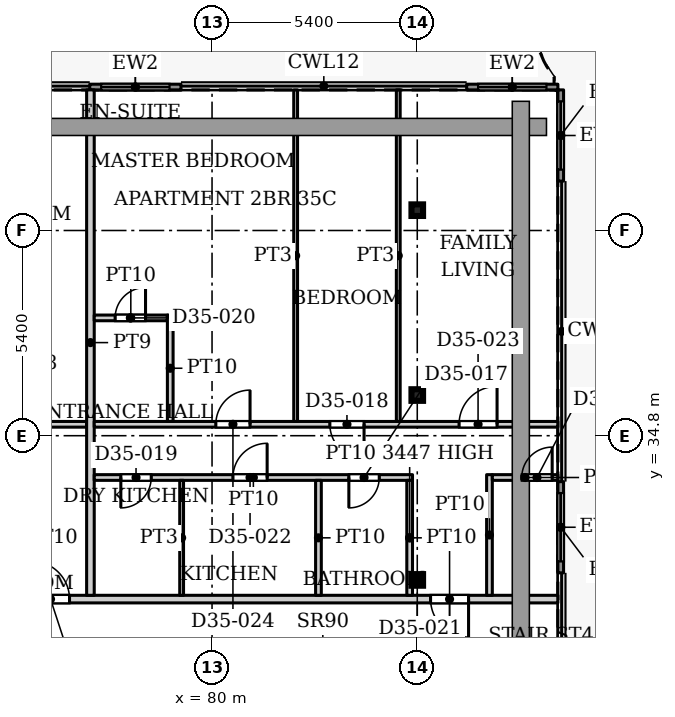
"""IFC4 building model, lengths in metres.
Left out: names, types, materials, properties, quantities, classifications, styles, units other than length and angle.
Written with IfcOpenShell. Run it as: python <this file> out.ifc"""

import sys

from ifc_helpers import new_model, si_unit, direction, frame, frame_2d, origin, origin_2d, place, context, subcontext, project, spatial, rectangle, hollow_rectangle, extrude, source, transform, mapped, element, fill, save


model = new_model("IFC4")
c1 = context("Model", 3, precision=1e-05, world=origin(), true_north=direction((0.0, 1.0)))
c2 = subcontext(c1, "Body", "Model", "MODEL_VIEW")
j1 = project(units=[si_unit("LENGTHUNIT", "METRE"), si_unit("PLANEANGLEUNIT", "RADIAN")], contexts=[c1])
p1 = place(None, origin())
s1 = spatial("IfcSite", under=j1, at=p1, CompositionType="ELEMENT")
p2 = place(p1, origin())
s2 = spatial("IfcBuilding", under=s1, at=p2, CompositionType="ELEMENT")
p3 = place(p2, frame((0.0, 0.0, 152.6)))
s3 = spatial("IfcBuildingStorey", under=s2, at=p3, CompositionType="ELEMENT", Elevation=152.6)
for number, where, z_axis, x_axis in (
    (1, (85.4, 31.005, 0.0), (0.0, 0.0, 1.0), (1.0, 0.0, 0.0)),
    (2, (85.4, 35.87, 0.0), (0.0, 0.0, 1.0), (1.0, 0.0, 0.0)),
    (3, (85.4, 40.735, 0.0), (0.0, 0.0, 1.0), (1.0, 0.0, 0.0)),
):
    element("IfcColumn", number, at=place(p3, frame(where, z_axis=z_axis, x_axis=x_axis)), inside=s3, PredefinedType="COLUMN", context=c2, shape_type="SweptSolid", body=[
        extrude(hollow_rectangle(XDim=0.305, YDim=0.305, WallThickness=0.016, InnerFilletRadius=0.016, OuterFilletRadius=0.032, at=origin_2d()), origin(), (0.0, 0.0, 1.0), 3.9),
    ])
p4 = place(p3, frame((76.782, 43.975, 0.0), z_axis=(0.0, 0.0, 1.0), x_axis=(1.0, 0.0, 0.0)))
e4 = element("IfcWall", 4, at=p4, inside=s3, PredefinedType="SOLIDWALL", context=c2, shape_type="SweptSolid", body=[
    extrude(rectangle(XDim=2.4, YDim=0.15, at=frame_2d((1.2, 0.0))), origin(), (0.0, 0.0, 1.0), 3.75),
])
p5 = place(p4, frame((0.3, 0.0, 0.0)))
e5 = element("IfcOpeningElement", 5, at=p5, cuts=e4, PredefinedType="OPENING", context=c2, shape_type="SweptSolid", body=[
    extrude(rectangle(XDim=1.8, YDim=2.4, at=frame_2d((0.9, 1.2))), frame((0.0, 0.085, 0.0), z_axis=(0.0, -1.0, 0.0), x_axis=(1.0, 0.0, 0.0)), (0.0, 0.0, 1.0), 0.17),
])
p6 = place(p3, frame((86.7, 43.975, 0.0), z_axis=(0.0, 0.0, 1.0), x_axis=(1.0, 0.0, 0.0)))
e6 = element("IfcWall", 6, at=p6, inside=s3, PredefinedType="SOLIDWALL", context=c2, shape_type="SweptSolid", body=[
    extrude(rectangle(XDim=2.4, YDim=0.15, at=frame_2d((1.2, 0.0))), origin(), (0.0, 0.0, 1.0), 3.75),
])
p7 = place(p6, frame((0.3, 0.0, 0.0)))
e7 = element("IfcOpeningElement", 7, at=p7, cuts=e6, PredefinedType="OPENING", context=c2, shape_type="SweptSolid", body=[
    extrude(rectangle(XDim=1.8, YDim=2.4, at=frame_2d((0.9, 1.2))), frame((0.0, 0.085, 0.0), z_axis=(0.0, -1.0, 0.0), x_axis=(1.0, 0.0, 0.0)), (0.0, 0.0, 1.0), 0.17),
])
p8 = place(p3, frame((89.175, 43.9, 0.0), z_axis=(0.0, 0.0, 1.0), x_axis=(0.0, -1.0, 0.0)))
e8 = element("IfcWall", 8, at=p8, inside=s3, PredefinedType="SOLIDWALL", context=c2, shape_type="SweptSolid", body=[
    extrude(rectangle(XDim=2.4, YDim=0.15, at=frame_2d((1.2, 0.0))), origin(), (0.0, 0.0, 1.0), 3.75),
])
p9 = place(p8, frame((0.3, 0.0, 0.0)))
e9 = element("IfcOpeningElement", 9, at=p9, cuts=e8, PredefinedType="OPENING", context=c2, shape_type="SweptSolid", body=[
    extrude(rectangle(XDim=1.8, YDim=2.4, at=frame_2d((0.9, 1.2))), frame((0.0, 0.085, 0.0), z_axis=(0.0, -1.0, 0.0), x_axis=(1.0, 0.0, 0.0)), (0.0, 0.0, 1.0), 0.17),
])
p10 = place(p3, frame((89.175, 33.591, 0.0), z_axis=(0.0, 0.0, 1.0), x_axis=(0.0, -1.0, 0.0)))
e10 = element("IfcWall", 10, at=p10, inside=s3, PredefinedType="SOLIDWALL", context=c2, shape_type="SweptSolid", body=[
    extrude(rectangle(XDim=2.4, YDim=0.15, at=frame_2d((1.2, 0.0))), origin(), (0.0, 0.0, 1.0), 3.75),
])
p11 = place(p10, frame((0.3, 0.0, 0.0)))
e11 = element("IfcOpeningElement", 11, at=p11, cuts=e10, PredefinedType="OPENING", context=c2, shape_type="SweptSolid", body=[
    extrude(rectangle(XDim=1.8, YDim=2.4, at=frame_2d((0.9, 1.2))), frame((0.0, 0.085, 0.0), z_axis=(0.0, -1.0, 0.0), x_axis=(1.0, 0.0, 0.0)), (0.0, 0.0, 1.0), 0.17),
])
p12 = place(p3, frame((53.549, 30.5, 0.0), z_axis=(0.0, 0.0, 1.0), x_axis=(1.0, 0.0, 0.0)))
e12 = element("IfcWall", 12, at=p12, inside=s3, PredefinedType="PARTITIONING", context=c2, shape_type="SweptSolid", body=[
    extrude(rectangle(XDim=35.551, YDim=0.2, at=frame_2d((17.775, 0.0))), origin(), (0.0, 0.0, 1.0), 3.6),
])
p13 = place(p12, frame((0.251, 0.0, 0.0)))
e13 = element("IfcOpeningElement", 13, at=p13, cuts=e12, PredefinedType="OPENING", context=c2, shape_type="SweptSolid", body=[
    extrude(rectangle(XDim=1.0, YDim=2.1, at=frame_2d((0.5, 1.05))), frame((0.0, 0.11, 0.0), z_axis=(0.0, -1.0, 0.0), x_axis=(1.0, 0.0, 0.0)), (0.0, 0.0, 1.0), 0.22),
])
p14 = place(p12, frame((21.701, 0.0, 0.0)))
e14 = element("IfcOpeningElement", 14, at=p14, cuts=e12, PredefinedType="OPENING", context=c2, shape_type="SweptSolid", body=[
    extrude(rectangle(XDim=1.0, YDim=2.1, at=frame_2d((0.5, 1.05))), frame((0.0, 0.11, 0.0), z_axis=(0.0, -1.0, 0.0), x_axis=(1.0, 0.0, 0.0)), (0.0, 0.0, 1.0), 0.22),
])
p15 = place(p12, frame((32.201, 0.0, 0.0)))
e15 = element("IfcOpeningElement", 15, at=p15, cuts=e12, PredefinedType="OPENING", context=c2, shape_type="SweptSolid", body=[
    extrude(rectangle(XDim=1.0, YDim=2.1, at=frame_2d((0.5, 1.05))), frame((0.0, 0.11, 0.0), z_axis=(0.0, -1.0, 0.0), x_axis=(1.0, 0.0, 0.0)), (0.0, 0.0, 1.0), 0.22),
])
p16 = place(p3, frame((62.8, 35.1, 0.0), z_axis=(0.0, 0.0, 1.0), x_axis=(1.0, 0.0, 0.0)))
e16 = element("IfcWall", 16, at=p16, inside=s3, PredefinedType="PARTITIONING", context=c2, shape_type="SweptSolid", body=[
    extrude(rectangle(XDim=13.9, YDim=0.15, at=frame_2d((6.95, 0.0))), origin(), (0.0, 0.0, 1.0), 3.6),
])
p17 = place(p16, frame((11.6, 0.0, 0.0)))
e17 = element("IfcOpeningElement", 17, at=p17, cuts=e16, PredefinedType="OPENING", context=c2, shape_type="SweptSolid", body=[
    extrude(rectangle(XDim=0.9, YDim=2.1, at=frame_2d((0.45, 1.05))), frame((0.0, 0.085, 0.0), z_axis=(0.0, -1.0, 0.0), x_axis=(1.0, 0.0, 0.0)), (0.0, 0.0, 1.0), 0.17),
])
p18 = place(p16, frame((1.8, 0.0, 0.0)))
e18 = element("IfcOpeningElement", 18, at=p18, cuts=e16, PredefinedType="OPENING", context=c2, shape_type="SweptSolid", body=[
    extrude(rectangle(XDim=1.0, YDim=2.1, at=frame_2d((0.5, 1.05))), frame((0.0, 0.085, 0.0), z_axis=(0.0, -1.0, 0.0), x_axis=(1.0, 0.0, 0.0)), (0.0, 0.0, 1.0), 0.17),
])
p19 = place(p16, frame((5.5, 0.0, 0.0)))
e19 = element("IfcOpeningElement", 19, at=p19, cuts=e16, PredefinedType="OPENING", context=c2, shape_type="SweptSolid", body=[
    extrude(rectangle(XDim=0.9, YDim=2.1, at=frame_2d((0.45, 1.05))), frame((0.0, 0.085, 0.0), z_axis=(0.0, -1.0, 0.0), x_axis=(1.0, 0.0, 0.0)), (0.0, 0.0, 1.0), 0.17),
])
p20 = place(p3, frame((76.8, 30.6, 0.0), z_axis=(0.0, 0.0, 1.0), x_axis=(0.0, 1.0, 0.0)))
e20 = element("IfcWall", 20, at=p20, inside=s3, PredefinedType="PARTITIONING", context=c2, shape_type="SweptSolid", body=[
    extrude(rectangle(XDim=13.3, YDim=0.2, at=frame_2d((6.65, 0.0))), origin(), (0.0, 0.0, 1.0), 3.6),
])
p21 = place(p3, frame((76.9, 33.7, 0.0), z_axis=(0.0, 0.0, 1.0), x_axis=(1.0, 0.0, 0.0)))
e21 = element("IfcWall", 21, at=p21, inside=s3, PredefinedType="PARTITIONING", context=c2, shape_type="SweptSolid", body=[
    extrude(rectangle(XDim=8.375, YDim=0.15, at=frame_2d((4.188, 0.0))), origin(), (0.0, 0.0, 1.0), 3.6),
])
p22 = place(p21, frame((6.7, 0.0, 0.0)))
e22 = element("IfcOpeningElement", 22, at=p22, cuts=e21, PredefinedType="OPENING", context=c2, shape_type="SweptSolid", body=[
    extrude(rectangle(XDim=0.8, YDim=2.1, at=frame_2d((0.4, 1.05))), frame((0.0, 0.085, 0.0), z_axis=(0.0, -1.0, 0.0), x_axis=(1.0, 0.0, 0.0)), (0.0, 0.0, 1.0), 0.17),
])
p23 = place(p21, frame((0.7, 0.0, 0.0)))
e23 = element("IfcOpeningElement", 23, at=p23, cuts=e21, PredefinedType="OPENING", context=c2, shape_type="SweptSolid", body=[
    extrude(rectangle(XDim=0.8, YDim=2.1, at=frame_2d((0.4, 1.05))), frame((0.0, 0.085, 0.0), z_axis=(0.0, -1.0, 0.0), x_axis=(1.0, 0.0, 0.0)), (0.0, 0.0, 1.0), 0.17),
])
p24 = place(p21, frame((3.65, 0.0, 0.0)))
e24 = element("IfcOpeningElement", 24, at=p24, cuts=e21, PredefinedType="OPENING", context=c2, shape_type="SweptSolid", body=[
    extrude(rectangle(XDim=0.9, YDim=2.1, at=frame_2d((0.45, 1.05))), frame((0.0, 0.085, 0.0), z_axis=(0.0, -1.0, 0.0), x_axis=(1.0, 0.0, 0.0)), (0.0, 0.0, 1.0), 0.17),
])
p25 = place(p3, frame((76.9, 35.1, 0.0), z_axis=(0.0, 0.0, 1.0), x_axis=(1.0, 0.0, 0.0)))
e25 = element("IfcWall", 25, at=p25, inside=s3, PredefinedType="PARTITIONING", context=c2, shape_type="SweptSolid", body=[
    extrude(rectangle(XDim=12.2, YDim=0.15, at=frame_2d((6.1, 0.0))), origin(), (0.0, 0.0, 1.0), 3.6),
])
p26 = place(p25, frame((6.2, 0.0, 0.0)))
e26 = element("IfcOpeningElement", 26, at=p26, cuts=e25, PredefinedType="OPENING", context=c2, shape_type="SweptSolid", body=[
    extrude(rectangle(XDim=0.9, YDim=2.1, at=frame_2d((0.45, 1.05))), frame((0.0, 0.085, 0.0), z_axis=(0.0, -1.0, 0.0), x_axis=(1.0, 0.0, 0.0)), (0.0, 0.0, 1.0), 0.17),
])
p27 = place(p25, frame((9.6, 0.0, 0.0)))
e27 = element("IfcOpeningElement", 27, at=p27, cuts=e25, PredefinedType="OPENING", context=c2, shape_type="SweptSolid", body=[
    extrude(rectangle(XDim=1.0, YDim=2.1, at=frame_2d((0.5, 1.05))), frame((0.0, 0.085, 0.0), z_axis=(0.0, -1.0, 0.0), x_axis=(1.0, 0.0, 0.0)), (0.0, 0.0, 1.0), 0.17),
])
p28 = place(p25, frame((3.2, 0.0, 0.0)))
e28 = element("IfcOpeningElement", 28, at=p28, cuts=e25, PredefinedType="OPENING", context=c2, shape_type="SweptSolid", body=[
    extrude(rectangle(XDim=0.9, YDim=2.1, at=frame_2d((0.45, 1.05))), frame((0.0, 0.085, 0.0), z_axis=(0.0, -1.0, 0.0), x_axis=(1.0, 0.0, 0.0)), (0.0, 0.0, 1.0), 0.17),
])
p29 = place(p3, frame((76.9, 37.9, 0.0), z_axis=(0.0, 0.0, 1.0), x_axis=(1.0, 0.0, 0.0)))
e29 = element("IfcWall", 29, at=p29, inside=s3, PredefinedType="PARTITIONING", context=c2, shape_type="SweptSolid", body=[
    extrude(rectangle(XDim=1.925, YDim=0.15, at=frame_2d((0.962, 0.0))), origin(), (0.0, 0.0, 1.0), 3.6),
])
p30 = place(p29, frame((0.55, 0.0, 0.0)))
e30 = element("IfcOpeningElement", 30, at=p30, cuts=e29, PredefinedType="OPENING", context=c2, shape_type="SweptSolid", body=[
    extrude(rectangle(XDim=0.8, YDim=2.1, at=frame_2d((0.4, 1.05))), frame((0.0, 0.085, 0.0), z_axis=(0.0, -1.0, 0.0), x_axis=(1.0, 0.0, 0.0)), (0.0, 0.0, 1.0), 0.17),
])
p31 = place(p3, frame((78.9, 35.175, 0.0), z_axis=(0.0, 0.0, 1.0), x_axis=(0.0, 1.0, 0.0)))
e31 = element("IfcWall", 31, at=p31, inside=s3, PredefinedType="PARTITIONING", context=c2, shape_type="SweptSolid", body=[
    extrude(rectangle(XDim=2.8, YDim=0.15, at=frame_2d((1.4, 0.0))), origin(), (0.0, 0.0, 1.0), 3.6),
])
p32 = place(p3, frame((79.2, 30.6, 0.0), z_axis=(0.0, 0.0, 1.0), x_axis=(0.0, 1.0, 0.0)))
e32 = element("IfcWall", 32, at=p32, inside=s3, PredefinedType="PARTITIONING", context=c2, shape_type="SweptSolid", body=[
    extrude(rectangle(XDim=3.025, YDim=0.1, at=frame_2d((1.512, 0.0))), origin(), (0.0, 0.0, 1.0), 3.6),
])
p33 = place(p3, frame((82.2, 35.175, 0.0), z_axis=(0.0, 0.0, 1.0), x_axis=(0.0, 1.0, 0.0)))
e33 = element("IfcWall", 33, at=p33, inside=s3, PredefinedType="PARTITIONING", context=c2, shape_type="SweptSolid", body=[
    extrude(rectangle(XDim=8.725, YDim=0.1, at=frame_2d((4.362, 0.0))), origin(), (0.0, 0.0, 1.0), 3.6),
])
p34 = place(p3, frame((82.8, 30.6, 0.0), z_axis=(0.0, 0.0, 1.0), x_axis=(0.0, 1.0, 0.0)))
e34 = element("IfcWall", 34, at=p34, inside=s3, PredefinedType="PARTITIONING", context=c2, shape_type="SweptSolid", body=[
    extrude(rectangle(XDim=3.025, YDim=0.15, at=frame_2d((1.512, 0.0))), origin(), (0.0, 0.0, 1.0), 3.6),
])
p35 = place(p3, frame((84.9, 35.175, 0.0), z_axis=(0.0, 0.0, 1.0), x_axis=(0.0, 1.0, 0.0)))
e35 = element("IfcWall", 35, at=p35, inside=s3, PredefinedType="PARTITIONING", context=c2, shape_type="SweptSolid", body=[
    extrude(rectangle(XDim=8.725, YDim=0.1, at=frame_2d((4.362, 0.0))), origin(), (0.0, 0.0, 1.0), 3.6),
])
p36 = place(p3, frame((85.2, 30.6, 0.0), z_axis=(0.0, 0.0, 1.0), x_axis=(0.0, 1.0, 0.0)))
e36 = element("IfcWall", 36, at=p36, inside=s3, PredefinedType="PARTITIONING", context=c2, shape_type="SweptSolid", body=[
    extrude(rectangle(XDim=3.025, YDim=0.15, at=frame_2d((1.512, 0.0))), origin(), (0.0, 0.0, 1.0), 3.447),
])
p37 = place(p3, frame((87.3, 30.6, 0.0), z_axis=(0.0, 0.0, 1.0), x_axis=(0.0, 1.0, 0.0)))
e37 = element("IfcWall", 37, at=p37, inside=s3, PredefinedType="PARTITIONING", context=c2, shape_type="SweptSolid", body=[
    extrude(rectangle(XDim=3.175, YDim=0.15, at=frame_2d((1.587, 0.0))), origin(), (0.0, 0.0, 1.0), 3.6),
])
p38 = place(p3, frame((87.375, 33.7, 0.0), z_axis=(0.0, 0.0, 1.0), x_axis=(1.0, 0.0, 0.0)))
e38 = element("IfcWall", 38, at=p38, inside=s3, PredefinedType="PARTITIONING", context=c2, shape_type="SweptSolid", body=[
    extrude(rectangle(XDim=1.725, YDim=0.15, at=frame_2d((0.863, 0.0))), origin(), (0.0, 0.0, 1.0), 3.6),
])
p39 = place(p38, frame((0.775, 0.0, 0.0)))
e39 = element("IfcOpeningElement", 39, at=p39, cuts=e38, PredefinedType="OPENING", context=c2, shape_type="SweptSolid", body=[
    extrude(rectangle(XDim=0.8, YDim=2.1, at=frame_2d((0.4, 1.05))), frame((0.0, 0.085, 0.0), z_axis=(0.0, -1.0, 0.0), x_axis=(1.0, 0.0, 0.0)), (0.0, 0.0, 1.0), 0.17),
])
m1 = source(origin(), c2, "Body", "SweptSolid", [
    extrude(rectangle(XDim=1.8, YDim=2.4, at=frame_2d((0.9, 1.2))), frame((0.0, 0.025, 0.0), z_axis=(0.0, -1.0, 0.0), x_axis=(1.0, 0.0, 0.0)), (0.0, 0.0, 1.0), 0.05),
])
p40 = place(p5, origin())
e40 = element("IfcDoor", 40, at=p40, inside=s3, OperationType="SLIDING_TO_LEFT", PredefinedType="DOOR", context=c2, shape_type="MappedRepresentation", body=[
    mapped(m1, transform((0.0, 0.0, 0.0), x_axis=(1.0, 0.0, 0.0), y_axis=(0.0, 1.0, 0.0), z_axis=(0.0, 0.0, 1.0), scale=1.0)),
])
fill(e5, e40)
p41 = place(p7, origin())
e41 = element("IfcDoor", 41, at=p41, inside=s3, OperationType="SLIDING_TO_LEFT", PredefinedType="DOOR", context=c2, shape_type="MappedRepresentation", body=[
    mapped(m1, transform((0.0, 0.0, 0.0), x_axis=(1.0, 0.0, 0.0), y_axis=(0.0, 1.0, 0.0), z_axis=(0.0, 0.0, 1.0), scale=1.0)),
])
fill(e7, e41)
p42 = place(p9, origin())
e42 = element("IfcDoor", 42, at=p42, inside=s3, OperationType="SLIDING_TO_LEFT", PredefinedType="DOOR", context=c2, shape_type="MappedRepresentation", body=[
    mapped(m1, transform((0.0, 0.0, 0.0), x_axis=(1.0, 0.0, 0.0), y_axis=(0.0, 1.0, 0.0), z_axis=(0.0, 0.0, 1.0), scale=1.0)),
])
fill(e9, e42)
p43 = place(p11, origin())
e43 = element("IfcDoor", 43, at=p43, inside=s3, OperationType="SLIDING_TO_LEFT", PredefinedType="DOOR", context=c2, shape_type="MappedRepresentation", body=[
    mapped(m1, transform((0.0, 0.0, 0.0), x_axis=(1.0, 0.0, 0.0), y_axis=(0.0, 1.0, 0.0), z_axis=(0.0, 0.0, 1.0), scale=1.0)),
])
fill(e11, e43)
m2 = source(origin(), c2, "Body", "SweptSolid", [
    extrude(rectangle(XDim=1.0, YDim=2.1, at=frame_2d((0.5, 1.05))), frame((0.0, 0.025, 0.0), z_axis=(0.0, -1.0, 0.0), x_axis=(1.0, 0.0, 0.0)), (0.0, 0.0, 1.0), 0.05),
])
p44 = place(p14, origin())
e44 = element("IfcDoor", 44, at=p44, inside=s3, OperationType="SINGLE_SWING_LEFT", PredefinedType="DOOR", context=c2, shape_type="MappedRepresentation", body=[
    mapped(m2, transform((0.0, 0.0, 0.0), x_axis=(1.0, 0.0, 0.0), y_axis=(0.0, 1.0, 0.0), z_axis=(0.0, 0.0, 1.0), scale=1.0)),
])
fill(e14, e44)
m3 = source(origin(), c2, "Body", "SweptSolid", [
    extrude(rectangle(XDim=0.8, YDim=2.1, at=frame_2d((0.4, 1.05))), frame((0.0, 0.025, 0.0), z_axis=(0.0, -1.0, 0.0), x_axis=(1.0, 0.0, 0.0)), (0.0, 0.0, 1.0), 0.05),
])
p45 = place(p22, origin())
e45 = element("IfcDoor", 45, at=p45, inside=s3, OperationType="SINGLE_SWING_RIGHT", PredefinedType="DOOR", context=c2, shape_type="MappedRepresentation", body=[
    mapped(m3, transform((0.0, 0.0, 0.0), x_axis=(1.0, 0.0, 0.0), y_axis=(0.0, 1.0, 0.0), z_axis=(0.0, 0.0, 1.0), scale=1.0)),
])
fill(e22, e45)
m4 = source(origin(), c2, "Body", "SweptSolid", [
    extrude(rectangle(XDim=0.9, YDim=2.1, at=frame_2d((0.45, 1.05))), frame((0.0, 0.025, 0.0), z_axis=(0.0, -1.0, 0.0), x_axis=(1.0, 0.0, 0.0)), (0.0, 0.0, 1.0), 0.05),
])
p46 = place(p26, origin())
e46 = element("IfcDoor", 46, at=p46, inside=s3, OperationType="SINGLE_SWING_RIGHT", PredefinedType="DOOR", context=c2, shape_type="MappedRepresentation", body=[
    mapped(m4, transform((0.0, 0.0, 0.0), x_axis=(1.0, 0.0, 0.0), y_axis=(0.0, 1.0, 0.0), z_axis=(0.0, 0.0, 1.0), scale=1.0)),
])
fill(e26, e46)
p47 = place(p23, origin())
e47 = element("IfcDoor", 47, at=p47, inside=s3, OperationType="SINGLE_SWING_RIGHT", PredefinedType="DOOR", context=c2, shape_type="MappedRepresentation", body=[
    mapped(m3, transform((0.0, 0.0, 0.0), x_axis=(1.0, 0.0, 0.0), y_axis=(0.0, 1.0, 0.0), z_axis=(0.0, 0.0, 1.0), scale=1.0)),
])
fill(e23, e47)
p48 = place(p30, origin())
e48 = element("IfcDoor", 48, at=p48, inside=s3, OperationType="SINGLE_SWING_LEFT", PredefinedType="DOOR", context=c2, shape_type="MappedRepresentation", body=[
    mapped(m3, transform((0.0, 0.0, 0.0), x_axis=(1.0, 0.0, 0.0), y_axis=(0.0, 1.0, 0.0), z_axis=(0.0, 0.0, 1.0), scale=1.0)),
])
fill(e30, e48)
p49 = place(p15, origin())
e49 = element("IfcDoor", 49, at=p49, inside=s3, OperationType="SINGLE_SWING_RIGHT", PredefinedType="DOOR", context=c2, shape_type="MappedRepresentation", body=[
    mapped(m2, transform((0.0, 0.0, 0.0), x_axis=(1.0, 0.0, 0.0), y_axis=(0.0, 1.0, 0.0), z_axis=(0.0, 0.0, 1.0), scale=1.0)),
])
fill(e15, e49)
p50 = place(p24, origin())
e50 = element("IfcDoor", 50, at=p50, inside=s3, OperationType="SINGLE_SWING_LEFT", PredefinedType="DOOR", context=c2, shape_type="MappedRepresentation", body=[
    mapped(m4, transform((0.0, 0.0, 0.0), x_axis=(1.0, 0.0, 0.0), y_axis=(0.0, 1.0, 0.0), z_axis=(0.0, 0.0, 1.0), scale=1.0)),
])
fill(e24, e50)
m5 = source(origin(), c2, "Body", "SweptSolid", [
    extrude(rectangle(XDim=1.0, YDim=2.1, at=frame_2d((0.5, 1.05))), frame((0.0, 0.025, 0.0), z_axis=(0.0, -1.0, 0.0), x_axis=(1.0, 0.0, 0.0)), (0.0, 0.0, 1.0), 0.05),
])
p51 = place(p27, origin())
e51 = element("IfcDoor", 51, at=p51, inside=s3, OperationType="SINGLE_SWING_LEFT", PredefinedType="DOOR", context=c2, shape_type="MappedRepresentation", body=[
    mapped(m5, transform((0.0, 0.0, 0.0), x_axis=(1.0, 0.0, 0.0), y_axis=(0.0, 1.0, 0.0), z_axis=(0.0, 0.0, 1.0), scale=1.0)),
])
fill(e27, e51)
p52 = place(p28, origin())
e52 = element("IfcDoor", 52, at=p52, inside=s3, OperationType="SINGLE_SWING_LEFT", PredefinedType="DOOR", context=c2, shape_type="MappedRepresentation", body=[
    mapped(m4, transform((0.0, 0.0, 0.0), x_axis=(1.0, 0.0, 0.0), y_axis=(0.0, 1.0, 0.0), z_axis=(0.0, 0.0, 1.0), scale=1.0)),
])
fill(e28, e52)
p53 = place(p39, origin())
e53 = element("IfcDoor", 53, at=p53, inside=s3, OperationType="SINGLE_SWING_LEFT", PredefinedType="DOOR", context=c2, shape_type="MappedRepresentation", body=[
    mapped(m3, transform((0.0, 0.0, 0.0), x_axis=(1.0, 0.0, 0.0), y_axis=(0.0, 1.0, 0.0), z_axis=(0.0, 0.0, 1.0), scale=1.0)),
])
fill(e39, e53)
save(model, sys.argv[1])
